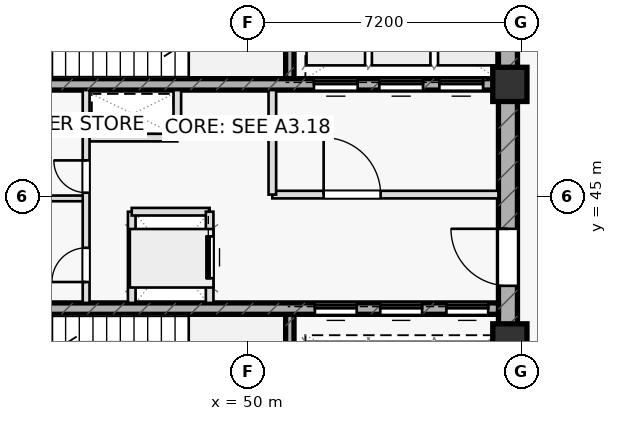
"""IFC4 building model, lengths in metres.
Left out: names, types, materials, properties, quantities, classifications, styles, units other than length and angle.
Written with IfcOpenShell. Run it as: python <this file> out.ifc"""

import sys

from ifc_helpers import new_model, si_unit, direction, frame, frame_2d, origin, origin_2d, place, context, subcontext, project, spatial, rectangle, extrude, element, fill, save


model = new_model("IFC4")
c1 = context("Model", 3, precision=1e-05, world=origin(), true_north=direction((0.0, 1.0)))
c2 = subcontext(c1, "Body", "Model", "MODEL_VIEW")
j1 = project(units=[si_unit("LENGTHUNIT", "METRE"), si_unit("PLANEANGLEUNIT", "RADIAN")], contexts=[c1])
p1 = place(None, origin())
s1 = spatial("IfcSite", under=j1, at=p1, CompositionType="ELEMENT")
p2 = place(p1, origin())
s2 = spatial("IfcBuilding", under=s1, at=p2, CompositionType="ELEMENT")
p3 = place(p2, frame((0.0, 0.0, 188.75)))
s3 = spatial("IfcBuildingStorey", under=s2, at=p3, CompositionType="ELEMENT", Elevation=188.75)
for number, where, z_axis, x_axis in (
    (1, (51.11, 48.1, 0.0), (0.0, 0.0, 1.0), (0.0, 1.0, 0.0)),
    (2, (51.11, 38.8, 0.0), (0.0, 0.0, 1.0), (0.0, 1.0, 0.0)),
):
    element("IfcWall", number, at=place(p3, frame(where, z_axis=z_axis, x_axis=x_axis)), inside=s3, PredefinedType="SHEAR", context=c2, shape_type="SweptSolid", body=[
        extrude(rectangle(XDim=3.1, YDim=0.22, at=frame_2d((1.55, 0.0))), origin(), (0.0, 0.0, 1.0), 3.55),
    ])
p4 = place(p3, frame((56.85, 38.8, 0.0), z_axis=(0.0, 0.0, 1.0), x_axis=(0.0, 1.0, 0.0)))
e3 = element("IfcWall", 3, at=p4, inside=s3, PredefinedType="SHEAR", context=c2, shape_type="SweptSolid", body=[
    extrude(rectangle(XDim=12.4, YDim=0.5, at=frame_2d((6.2, 0.0))), origin(), (0.0, 0.0, 1.0), 3.55),
])
p5 = place(p4, frame((3.85, 0.0, 0.0)))
e4 = element("IfcOpeningElement", 4, at=p5, cuts=e3, PredefinedType="OPENING", context=c2, shape_type="SweptSolid", body=[
    extrude(rectangle(XDim=1.5, YDim=2.2, at=frame_2d((0.75, 1.1))), frame((0.0, 0.26, 0.0), z_axis=(0.0, -1.0, 0.0), x_axis=(1.0, 0.0, 0.0)), (0.0, 0.0, 1.0), 0.52),
])
p6 = place(p3, frame((43.4, 47.95, 0.0), z_axis=(0.0, 0.0, 1.0), x_axis=(1.0, 0.0, 0.0)))
e5 = element("IfcWall", 5, at=p6, inside=s3, PredefinedType="SHEAR", context=c2, shape_type="SweptSolid", body=[
    extrude(rectangle(XDim=13.2, YDim=0.3, at=frame_2d((6.6, 0.0))), origin(), (0.0, 0.0, 1.0), 3.55),
])
p7 = place(p6, frame((8.345, 0.0, 0.0)))
e6 = element("IfcOpeningElement", 6, at=p7, cuts=e5, PredefinedType="OPENING", context=c2, shape_type="SweptSolid", body=[
    extrude(rectangle(XDim=1.15, YDim=2.2, at=frame_2d((0.575, 1.1))), frame((0.0, 0.16, 0.0), z_axis=(0.0, -1.0, 0.0), x_axis=(1.0, 0.0, 0.0)), (0.0, 0.0, 1.0), 0.32),
])
p8 = place(p6, frame((10.065, 0.0, 0.0)))
e7 = element("IfcOpeningElement", 7, at=p8, cuts=e5, PredefinedType="OPENING", context=c2, shape_type="SweptSolid", body=[
    extrude(rectangle(XDim=1.15, YDim=2.2, at=frame_2d((0.575, 1.1))), frame((0.0, 0.16, 0.0), z_axis=(0.0, -1.0, 0.0), x_axis=(1.0, 0.0, 0.0)), (0.0, 0.0, 1.0), 0.32),
])
p9 = place(p6, frame((11.645, 0.0, 0.0)))
e8 = element("IfcOpeningElement", 8, at=p9, cuts=e5, PredefinedType="OPENING", context=c2, shape_type="SweptSolid", body=[
    extrude(rectangle(XDim=1.15, YDim=2.2, at=frame_2d((0.575, 1.1))), frame((0.0, 0.16, 0.0), z_axis=(0.0, -1.0, 0.0), x_axis=(1.0, 0.0, 0.0)), (0.0, 0.0, 1.0), 0.32),
])
p10 = place(p3, frame((43.4, 42.05, 0.0), z_axis=(0.0, 0.0, 1.0), x_axis=(1.0, 0.0, 0.0)))
e9 = element("IfcWall", 9, at=p10, inside=s3, PredefinedType="SHEAR", context=c2, shape_type="SweptSolid", body=[
    extrude(rectangle(XDim=13.2, YDim=0.3, at=frame_2d((6.6, 0.0))), origin(), (0.0, 0.0, 1.0), 3.55),
])
p11 = place(p10, frame((8.37, 0.0, 0.0)))
e10 = element("IfcOpeningElement", 10, at=p11, cuts=e9, PredefinedType="OPENING", context=c2, shape_type="SweptSolid", body=[
    extrude(rectangle(XDim=1.1, YDim=2.15, at=frame_2d((0.55, 1.075))), frame((0.0, 0.16, 0.0), z_axis=(0.0, -1.0, 0.0), x_axis=(1.0, 0.0, 0.0)), (0.0, 0.0, 1.0), 0.32),
])
p12 = place(p10, frame((10.09, 0.0, 0.0)))
e11 = element("IfcOpeningElement", 11, at=p12, cuts=e9, PredefinedType="OPENING", context=c2, shape_type="SweptSolid", body=[
    extrude(rectangle(XDim=1.1, YDim=2.15, at=frame_2d((0.55, 1.075))), frame((0.0, 0.16, 0.0), z_axis=(0.0, -1.0, 0.0), x_axis=(1.0, 0.0, 0.0)), (0.0, 0.0, 1.0), 0.32),
])
p13 = place(p10, frame((11.83, 0.0, 0.0)))
e12 = element("IfcOpeningElement", 12, at=p13, cuts=e9, PredefinedType="OPENING", context=c2, shape_type="SweptSolid", body=[
    extrude(rectangle(XDim=1.1, YDim=2.15, at=frame_2d((0.55, 1.075))), frame((0.0, 0.16, 0.0), z_axis=(0.0, -1.0, 0.0), x_axis=(1.0, 0.0, 0.0)), (0.0, 0.0, 1.0), 0.32),
])
for number, where, z_axis, x_axis in (
    (13, (56.9, 47.95, 0.0), (0.0, 0.0, 1.0), (1.0, 0.0, 0.0)),
    (14, (56.9, 41.2, 0.0), (0.0, 0.0, 1.0), (1.0, 0.0, 0.0)),
):
    element("IfcColumn", number, at=place(p3, frame(where, z_axis=z_axis, x_axis=x_axis)), inside=s3, PredefinedType="COLUMN", context=c2, shape_type="SweptSolid", body=[
        extrude(rectangle(XDim=0.9, YDim=0.9, at=origin_2d()), origin(), (0.0, 0.0, 1.0), 3.55),
    ])
p14 = place(p3, frame((45.75, 46.55, 0.0), z_axis=(0.0, 0.0, 1.0), x_axis=(1.0, 0.0, 0.0)))
e15 = element("IfcWall", 15, at=p14, inside=s3, PredefinedType="PARTITIONING", context=c2, shape_type="SweptSolid", body=[
    extrude(rectangle(XDim=2.4, YDim=0.2, at=frame_2d((1.2, 0.0))), origin(), (0.0, 0.0, 1.0), 3.55),
])
p15 = place(p3, frame((48.15, 46.55, 0.0), z_axis=(0.0, 0.0, 1.0), x_axis=(0.0, 1.0, 0.0)))
e16 = element("IfcWall", 16, at=p15, inside=s3, PredefinedType="PARTITIONING", context=c2, shape_type="SweptSolid", body=[
    extrude(rectangle(XDim=1.25, YDim=0.2, at=frame_2d((0.625, 0.0))), origin(), (0.0, 0.0, 1.0), 3.55),
])
p16 = place(p3, frame((46.95, 42.2, 0.0), z_axis=(0.0, 0.0, 1.0), x_axis=(0.0, 1.0, 0.0)))
e17 = element("IfcWall", 17, at=p16, inside=s3, PredefinedType="PARTITIONING", context=c2, shape_type="SweptSolid", body=[
    extrude(rectangle(XDim=2.4, YDim=0.2, at=frame_2d((1.2, 0.0))), origin(), (0.0, 0.0, 1.0), 3.55),
])
p17 = place(p3, frame((46.95, 44.6, 0.0), z_axis=(0.0, 0.0, 1.0), x_axis=(1.0, 0.0, 0.0)))
e18 = element("IfcWall", 18, at=p17, inside=s3, PredefinedType="PARTITIONING", context=c2, shape_type="SweptSolid", body=[
    extrude(rectangle(XDim=2.05, YDim=0.2, at=frame_2d((1.025, 0.0))), origin(), (0.0, 0.0, 1.0), 3.55),
])
p18 = place(p3, frame((50.65, 45.05, 0.0), z_axis=(0.0, 0.0, 1.0), x_axis=(1.0, 0.0, 0.0)))
e19 = element("IfcWall", 19, at=p18, inside=s3, PredefinedType="PARTITIONING", context=c2, shape_type="SweptSolid", body=[
    extrude(rectangle(XDim=5.95, YDim=0.2, at=frame_2d((2.975, 0.0))), origin(), (0.0, 0.0, 1.0), 3.55),
])
p19 = place(p18, frame((1.35, 0.0, 0.0)))
e20 = element("IfcOpeningElement", 20, at=p19, cuts=e19, PredefinedType="OPENING", context=c2, shape_type="SweptSolid", body=[
    extrude(rectangle(XDim=1.5, YDim=2.2, at=frame_2d((0.75, 1.1))), frame((0.0, 0.11, 0.0), z_axis=(0.0, -1.0, 0.0), x_axis=(1.0, 0.0, 0.0)), (0.0, 0.0, 1.0), 0.22),
])
p20 = place(p3, frame((50.65, 45.05, 0.0), z_axis=(0.0, 0.0, 1.0), x_axis=(0.0, 1.0, 0.0)))
e21 = element("IfcWall", 21, at=p20, inside=s3, PredefinedType="PARTITIONING", context=c2, shape_type="SweptSolid", body=[
    extrude(rectangle(XDim=2.75, YDim=0.2, at=frame_2d((1.375, 0.0))), origin(), (0.0, 0.0, 1.0), 3.55),
])
p21 = place(p3, frame((43.4, 44.95, 0.0), z_axis=(0.0, 0.0, 1.0), x_axis=(1.0, 0.0, 0.0)))
e22 = element("IfcWall", 22, at=p21, inside=s3, PredefinedType="PARTITIONING", context=c2, shape_type="SweptSolid", body=[
    extrude(rectangle(XDim=2.35, YDim=0.15, at=frame_2d((1.175, 0.0))), origin(), (0.0, 0.0, 1.0), 3.55),
])
p22 = place(p3, frame((45.75, 42.2, 0.0), z_axis=(0.0, 0.0, 1.0), x_axis=(0.0, 1.0, 0.0)))
e23 = element("IfcWall", 23, at=p22, inside=s3, PredefinedType="PARTITIONING", context=c2, shape_type="SweptSolid", body=[
    extrude(rectangle(XDim=5.6, YDim=0.18, at=frame_2d((2.8, 0.0))), origin(), (0.0, 0.0, 1.0), 3.55),
])
p23 = place(p22, frame((0.55, 0.0, 0.0)))
e24 = element("IfcOpeningElement", 24, at=p23, cuts=e23, PredefinedType="OPENING", context=c2, shape_type="SweptSolid", body=[
    extrude(rectangle(XDim=0.9, YDim=2.05, at=frame_2d((0.45, 1.025))), frame((0.0, 0.1, 0.0), z_axis=(0.0, -1.0, 0.0), x_axis=(1.0, 0.0, 0.0)), (0.0, 0.0, 1.0), 0.2),
])
p24 = place(p22, frame((2.9, 0.0, 0.0)))
e25 = element("IfcOpeningElement", 25, at=p24, cuts=e23, PredefinedType="OPENING", context=c2, shape_type="SweptSolid", body=[
    extrude(rectangle(XDim=0.85, YDim=2.05, at=frame_2d((0.425, 1.025))), frame((0.0, 0.1, 0.0), z_axis=(0.0, -1.0, 0.0), x_axis=(1.0, 0.0, 0.0)), (0.0, 0.0, 1.0), 0.2),
])
p25 = place(p3, frame((49.0, 42.2, 0.0), z_axis=(0.0, 0.0, 1.0), x_axis=(0.0, 1.0, 0.0)))
e26 = element("IfcWall", 26, at=p25, inside=s3, PredefinedType="PARTITIONING", context=c2, shape_type="SweptSolid", body=[
    extrude(rectangle(XDim=2.4, YDim=0.2, at=frame_2d((1.2, 0.0))), origin(), (0.0, 0.0, 1.0), 3.55),
])
p26 = place(p25, frame((0.65, 0.0, 0.0)))
e27 = element("IfcOpeningElement", 27, at=p26, cuts=e26, PredefinedType="OPENING", context=c2, shape_type="SweptSolid", body=[
    extrude(rectangle(XDim=1.1, YDim=2.15, at=frame_2d((0.55, 1.075))), frame((0.0, 0.11, 0.0), z_axis=(0.0, -1.0, 0.0), x_axis=(1.0, 0.0, 0.0)), (0.0, 0.0, 1.0), 0.22),
])
p27 = place(p5, origin())
e28 = element("IfcDoor", 28, at=p27, inside=s3, OperationType="SINGLE_SWING_RIGHT", PredefinedType="DOOR", context=c2, shape_type="SweptSolid", body=[
    extrude(rectangle(XDim=1.5, YDim=2.2, at=frame_2d((0.75, 1.1))), frame((0.0, 0.025, 0.0), z_axis=(0.0, -1.0, 0.0), x_axis=(1.0, 0.0, 0.0)), (0.0, 0.0, 1.0), 0.05),
])
fill(e4, e28)
p28 = place(p19, origin())
e29 = element("IfcDoor", 29, at=p28, inside=s3, OperationType="SINGLE_SWING_LEFT", PredefinedType="DOOR", context=c2, shape_type="SweptSolid", body=[
    extrude(rectangle(XDim=1.5, YDim=2.2, at=frame_2d((0.75, 1.1))), frame((0.0, 0.025, 0.0), z_axis=(0.0, -1.0, 0.0), x_axis=(1.0, 0.0, 0.0)), (0.0, 0.0, 1.0), 0.05),
])
fill(e20, e29)
p29 = place(p23, origin())
e30 = element("IfcDoor", 30, at=p29, inside=s3, OperationType="SINGLE_SWING_LEFT", PredefinedType="DOOR", context=c2, shape_type="SweptSolid", body=[
    extrude(rectangle(XDim=0.9, YDim=2.05, at=frame_2d((0.45, 1.025))), frame((0.0, 0.025, 0.0), z_axis=(0.0, -1.0, 0.0), x_axis=(1.0, 0.0, 0.0)), (0.0, 0.0, 1.0), 0.05),
])
fill(e24, e30)
p30 = place(p24, origin())
e31 = element("IfcDoor", 31, at=p30, inside=s3, OperationType="SINGLE_SWING_RIGHT", PredefinedType="DOOR", context=c2, shape_type="SweptSolid", body=[
    extrude(rectangle(XDim=0.85, YDim=2.05, at=frame_2d((0.425, 1.025))), frame((0.0, 0.025, 0.0), z_axis=(0.0, -1.0, 0.0), x_axis=(1.0, 0.0, 0.0)), (0.0, 0.0, 1.0), 0.05),
])
fill(e25, e31)
p31 = place(p7, origin())
e32 = element("IfcDoor", 32, at=p31, inside=s3, OperationType="SLIDING_TO_LEFT", PredefinedType="DOOR", context=c2, shape_type="SweptSolid", body=[
    extrude(rectangle(XDim=1.15, YDim=2.2, at=frame_2d((0.575, 1.1))), frame((0.0, 0.025, 0.0), z_axis=(0.0, -1.0, 0.0), x_axis=(1.0, 0.0, 0.0)), (0.0, 0.0, 1.0), 0.05),
])
fill(e6, e32)
p32 = place(p8, origin())
e33 = element("IfcDoor", 33, at=p32, inside=s3, OperationType="SLIDING_TO_LEFT", PredefinedType="DOOR", context=c2, shape_type="SweptSolid", body=[
    extrude(rectangle(XDim=1.15, YDim=2.2, at=frame_2d((0.575, 1.1))), frame((0.0, 0.025, 0.0), z_axis=(0.0, -1.0, 0.0), x_axis=(1.0, 0.0, 0.0)), (0.0, 0.0, 1.0), 0.05),
])
fill(e7, e33)
p33 = place(p9, origin())
e34 = element("IfcDoor", 34, at=p33, inside=s3, OperationType="SLIDING_TO_LEFT", PredefinedType="DOOR", context=c2, shape_type="SweptSolid", body=[
    extrude(rectangle(XDim=1.15, YDim=2.2, at=frame_2d((0.575, 1.1))), frame((0.0, 0.025, 0.0), z_axis=(0.0, -1.0, 0.0), x_axis=(1.0, 0.0, 0.0)), (0.0, 0.0, 1.0), 0.05),
])
fill(e8, e34)
p34 = place(p11, origin())
e35 = element("IfcDoor", 35, at=p34, inside=s3, OperationType="SLIDING_TO_LEFT", PredefinedType="DOOR", context=c2, shape_type="SweptSolid", body=[
    extrude(rectangle(XDim=1.1, YDim=2.15, at=frame_2d((0.55, 1.075))), frame((0.0, 0.025, 0.0), z_axis=(0.0, -1.0, 0.0), x_axis=(1.0, 0.0, 0.0)), (0.0, 0.0, 1.0), 0.05),
])
fill(e10, e35)
p35 = place(p12, origin())
e36 = element("IfcDoor", 36, at=p35, inside=s3, OperationType="SLIDING_TO_LEFT", PredefinedType="DOOR", context=c2, shape_type="SweptSolid", body=[
    extrude(rectangle(XDim=1.1, YDim=2.15, at=frame_2d((0.55, 1.075))), frame((0.0, 0.025, 0.0), z_axis=(0.0, -1.0, 0.0), x_axis=(1.0, 0.0, 0.0)), (0.0, 0.0, 1.0), 0.05),
])
fill(e11, e36)
p36 = place(p13, origin())
e37 = element("IfcDoor", 37, at=p36, inside=s3, OperationType="SLIDING_TO_LEFT", PredefinedType="DOOR", context=c2, shape_type="SweptSolid", body=[
    extrude(rectangle(XDim=1.1, YDim=2.15, at=frame_2d((0.55, 1.075))), frame((0.0, 0.025, 0.0), z_axis=(0.0, -1.0, 0.0), x_axis=(1.0, 0.0, 0.0)), (0.0, 0.0, 1.0), 0.05),
])
fill(e12, e37)
p37 = place(p26, origin())
e38 = element("IfcDoor", 38, at=p37, inside=s3, OperationType="SLIDING_TO_RIGHT", PredefinedType="DOOR", context=c2, shape_type="SweptSolid", body=[
    extrude(rectangle(XDim=1.1, YDim=2.15, at=frame_2d((0.55, 1.075))), frame((0.0, 0.025, 0.0), z_axis=(0.0, -1.0, 0.0), x_axis=(1.0, 0.0, 0.0)), (0.0, 0.0, 1.0), 0.05),
])
fill(e27, e38)
save(model, sys.argv[1])
